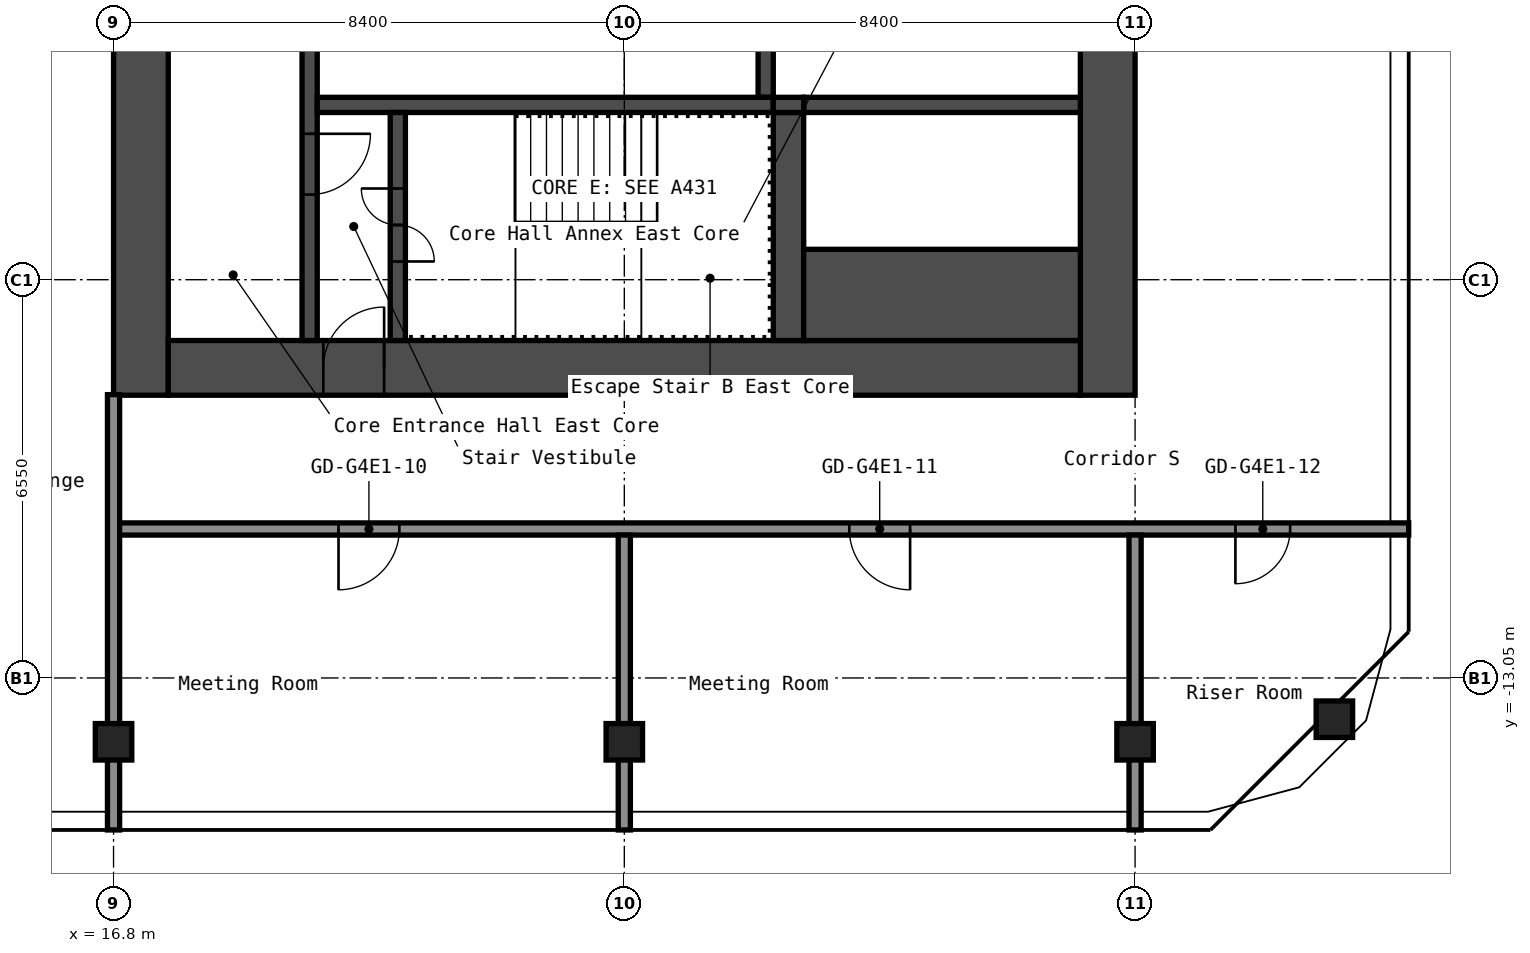
"""IFC4 building model, lengths in metres.
Left out: names, types, materials, properties, quantities, classifications, styles, units other than length and angle.
Written with IfcOpenShell. Run it as: python <this file> out.ifc"""

import sys

from ifc_helpers import new_model, si_unit, direction, frame, frame_2d, origin, origin_2d, place, context, subcontext, project, spatial, rectangle, hollow_rectangle, extrude, element, fill, save


model = new_model("IFC4")
c1 = context("Model", 3, precision=1e-05, world=origin(), true_north=direction((0.0, 1.0)))
c2 = subcontext(c1, "Body", "Model", "MODEL_VIEW")
j1 = project(units=[si_unit("LENGTHUNIT", "METRE"), si_unit("PLANEANGLEUNIT", "RADIAN")], contexts=[c1])
p1 = place(None, origin())
s1 = spatial("IfcSite", under=j1, at=p1, CompositionType="ELEMENT")
p2 = place(p1, origin())
s2 = spatial("IfcBuilding", under=s1, at=p2, CompositionType="ELEMENT")
p3 = place(p2, frame((0.0, 0.0, 215.4)))
s3 = spatial("IfcBuildingStorey", under=s2, at=p3, CompositionType="ELEMENT", Elevation=215.4)
for number, where, z_axis, x_axis in (
    (1, (16.8, -14.1, 0.0), (0.0, 0.0, 1.0), (1.0, 0.0, 0.0)),
    (2, (25.2, -14.1, 0.0), (0.0, 0.0, 1.0), (1.0, 0.0, 0.0)),
    (3, (33.6, -14.1, 0.0), (0.0, 0.0, 1.0), (1.0, 0.0, 0.0)),
    (4, (36.878, -13.729, 0.0), (0.0, 0.0, 1.0), (1.0, 0.0, 0.0)),
):
    element("IfcColumn", number, at=place(p3, frame(where, z_axis=z_axis, x_axis=x_axis)), inside=s3, PredefinedType="COLUMN", context=c2, shape_type="SweptSolid", body=[
        extrude(hollow_rectangle(XDim=0.6, YDim=0.6, WallThickness=0.025, InnerFilletRadius=0.038, OuterFilletRadius=0.062, at=origin_2d()), origin(), (0.0, 0.0, 1.0), 2.75),
    ])
p4 = place(p3, frame((17.25, -8.4, 0.0), z_axis=(0.0, 0.0, 1.0), x_axis=(0.0, 1.0, 0.0)))
e5 = element("IfcWall", 5, at=p4, inside=s3, PredefinedType="SHEAR", context=c2, shape_type="SweptSolid", body=[
    extrude(rectangle(XDim=16.8, YDim=0.9, at=frame_2d((8.4, 0.0))), origin(), (0.0, 0.0, 1.0), 2.75),
])
p5 = place(p4, frame((10.1, 0.0, 0.0)))
e6 = element("IfcOpeningElement", 6, at=p5, cuts=e5, PredefinedType="OPENING", context=c2, shape_type="SweptSolid", body=[
    extrude(rectangle(XDim=1.6, YDim=2.1, at=frame_2d((0.8, 1.05))), frame((0.0, 0.46, 0.0), z_axis=(0.0, -1.0, 0.0), x_axis=(1.0, 0.0, 0.0)), (0.0, 0.0, 1.0), 0.92),
])
p6 = place(p3, frame((33.15, -8.4, 0.0), z_axis=(0.0, 0.0, 1.0), x_axis=(0.0, 1.0, 0.0)))
e7 = element("IfcWall", 7, at=p6, inside=s3, PredefinedType="SHEAR", context=c2, shape_type="SweptSolid", body=[
    extrude(rectangle(XDim=16.8, YDim=0.9, at=frame_2d((8.4, 0.0))), origin(), (0.0, 0.0, 1.0), 2.75),
])
p7 = place(p3, frame((17.7, -7.95, 0.0), z_axis=(0.0, 0.0, 1.0), x_axis=(1.0, 0.0, 0.0)))
e8 = element("IfcWall", 8, at=p7, inside=s3, PredefinedType="SHEAR", context=c2, shape_type="SweptSolid", body=[
    extrude(rectangle(XDim=15.0, YDim=0.9, at=frame_2d((7.5, 0.0))), origin(), (0.0, 0.0, 1.0), 2.75),
])
p8 = place(p7, frame((2.55, 0.0, 0.0)))
e9 = element("IfcOpeningElement", 9, at=p8, cuts=e8, PredefinedType="OPENING", context=c2, shape_type="SweptSolid", body=[
    extrude(rectangle(XDim=1.0, YDim=2.1, at=frame_2d((0.5, 1.05))), frame((0.0, 0.46, 0.0), z_axis=(0.0, -1.0, 0.0), x_axis=(1.0, 0.0, 0.0)), (0.0, 0.0, 1.0), 0.92),
])
p9 = place(p3, frame((20.025, -7.5, 0.0), z_axis=(0.0, 0.0, 1.0), x_axis=(0.0, 1.0, 0.0)))
e10 = element("IfcWall", 10, at=p9, inside=s3, PredefinedType="SHEAR", context=c2, shape_type="SweptSolid", body=[
    extrude(rectangle(XDim=6.3, YDim=0.25, at=frame_2d((3.15, 0.0))), origin(), (0.0, 0.0, 1.0), 2.75),
])
p10 = place(p9, frame((2.4, 0.0, 0.0)))
e11 = element("IfcOpeningElement", 11, at=p10, cuts=e10, PredefinedType="OPENING", context=c2, shape_type="SweptSolid", body=[
    extrude(rectangle(XDim=1.0, YDim=2.1, at=frame_2d((0.5, 1.05))), frame((0.0, 0.135, 0.0), z_axis=(0.0, -1.0, 0.0), x_axis=(1.0, 0.0, 0.0)), (0.0, 0.0, 1.0), 0.27),
])
p11 = place(p3, frame((27.525, -3.5, 0.0), z_axis=(0.0, 0.0, 1.0), x_axis=(0.0, 1.0, 0.0)))
e12 = element("IfcWall", 12, at=p11, inside=s3, PredefinedType="SHEAR", context=c2, shape_type="SweptSolid", body=[
    extrude(rectangle(XDim=2.05, YDim=0.25, at=frame_2d((1.025, 0.0))), origin(), (0.0, 0.0, 1.0), 2.75),
])
p12 = place(p3, frame((20.15, -3.625, 0.0), z_axis=(0.0, 0.0, 1.0), x_axis=(1.0, 0.0, 0.0)))
e13 = element("IfcWall", 13, at=p12, inside=s3, PredefinedType="SHEAR", context=c2, shape_type="SweptSolid", body=[
    extrude(rectangle(XDim=7.5, YDim=0.25, at=frame_2d((3.75, 0.0))), origin(), (0.0, 0.0, 1.0), 2.75),
])
p13 = place(p3, frame((21.475, -7.5, 0.0), z_axis=(0.0, 0.0, 1.0), x_axis=(0.0, 1.0, 0.0)))
e14 = element("IfcWall", 14, at=p13, inside=s3, PredefinedType="SHEAR", context=c2, shape_type="SweptSolid", body=[
    extrude(rectangle(XDim=3.75, YDim=0.25, at=frame_2d((1.875, 0.0))), origin(), (0.0, 0.0, 1.0), 2.75),
])
p14 = place(p13, frame((1.3, 0.0, 0.0)))
e15 = element("IfcOpeningElement", 15, at=p14, cuts=e14, PredefinedType="OPENING", context=c2, shape_type="SweptSolid", body=[
    extrude(rectangle(XDim=1.2, YDim=2.1, at=frame_2d((0.6, 1.05))), frame((0.0, 0.135, 0.0), z_axis=(0.0, -1.0, 0.0), x_axis=(1.0, 0.0, 0.0)), (0.0, 0.0, 1.0), 0.27),
])
p15 = place(p3, frame((27.9, -7.5, 0.0), z_axis=(0.0, 0.0, 1.0), x_axis=(0.0, 1.0, 0.0)))
e16 = element("IfcWall", 16, at=p15, inside=s3, PredefinedType="SHEAR", context=c2, shape_type="SweptSolid", body=[
    extrude(rectangle(XDim=3.75, YDim=0.5, at=frame_2d((1.875, 0.0))), origin(), (0.0, 0.0, 1.0), 2.75),
])
p16 = place(p3, frame((28.15, -3.625, 0.0), z_axis=(0.0, 0.0, 1.0), x_axis=(1.0, 0.0, 0.0)))
e17 = element("IfcWall", 17, at=p16, inside=s3, PredefinedType="SHEAR", context=c2, shape_type="SweptSolid", body=[
    extrude(rectangle(XDim=4.55, YDim=0.25, at=frame_2d((2.275, 0.0))), origin(), (0.0, 0.0, 1.0), 2.75),
])
p17 = place(p3, frame((28.15, -6.75, 0.0), z_axis=(0.0, 0.0, 1.0), x_axis=(1.0, 0.0, 0.0)))
e18 = element("IfcWall", 18, at=p17, inside=s3, PredefinedType="SHEAR", context=c2, shape_type="SweptSolid", body=[
    extrude(rectangle(XDim=4.55, YDim=1.5, at=frame_2d((2.275, 0.0))), origin(), (0.0, 0.0, 1.0), 2.75),
])
p18 = place(p3, frame((27.65, -3.625, 0.0), z_axis=(0.0, 0.0, 1.0), x_axis=(1.0, 0.0, 0.0)))
e19 = element("IfcWall", 19, at=p18, inside=s3, PredefinedType="SHEAR", context=c2, shape_type="SweptSolid", body=[
    extrude(rectangle(XDim=0.5, YDim=0.25, at=frame_2d((0.25, 0.0))), origin(), (0.0, 0.0, 1.0), 2.75),
])
p19 = place(p3, frame((16.8, -10.6, 0.0), z_axis=(0.0, 0.0, 1.0), x_axis=(1.0, 0.0, 0.0)))
e20 = element("IfcWall", 20, at=p19, inside=s3, PredefinedType="PARTITIONING", context=c2, shape_type="SweptSolid", body=[
    extrude(rectangle(XDim=21.3, YDim=0.2, at=frame_2d((10.65, 0.0))), origin(), (0.0, 0.0, 1.0), 2.75),
])
p20 = place(p19, frame((3.7, 0.0, 0.0)))
e21 = element("IfcOpeningElement", 21, at=p20, cuts=e20, PredefinedType="OPENING", context=c2, shape_type="SweptSolid", body=[
    extrude(rectangle(XDim=1.0, YDim=2.1, at=frame_2d((0.5, 1.05))), frame((0.0, 0.11, 0.0), z_axis=(0.0, -1.0, 0.0), x_axis=(1.0, 0.0, 0.0)), (0.0, 0.0, 1.0), 0.22),
])
p21 = place(p19, frame((12.1, 0.0, 0.0)))
e22 = element("IfcOpeningElement", 22, at=p21, cuts=e20, PredefinedType="OPENING", context=c2, shape_type="SweptSolid", body=[
    extrude(rectangle(XDim=1.0, YDim=2.1, at=frame_2d((0.5, 1.05))), frame((0.0, 0.11, 0.0), z_axis=(0.0, -1.0, 0.0), x_axis=(1.0, 0.0, 0.0)), (0.0, 0.0, 1.0), 0.22),
])
p22 = place(p19, frame((18.45, 0.0, 0.0)))
e23 = element("IfcOpeningElement", 23, at=p22, cuts=e20, PredefinedType="OPENING", context=c2, shape_type="SweptSolid", body=[
    extrude(rectangle(XDim=0.9, YDim=2.1, at=frame_2d((0.45, 1.05))), frame((0.0, 0.11, 0.0), z_axis=(0.0, -1.0, 0.0), x_axis=(1.0, 0.0, 0.0)), (0.0, 0.0, 1.0), 0.22),
])
p23 = place(p3, frame((16.8, -15.55, 0.0), z_axis=(0.0, 0.0, 1.0), x_axis=(0.0, 1.0, 0.0)))
e24 = element("IfcWall", 24, at=p23, inside=s3, PredefinedType="PARTITIONING", context=c2, shape_type="SweptSolid", body=[
    extrude(rectangle(XDim=7.16, YDim=0.2, at=frame_2d((3.58, 0.0))), origin(), (0.0, 0.0, 1.0), 2.75),
])
for number, where, z_axis, x_axis in (
    (25, (25.2, -15.55, 0.0), (0.0, 0.0, 1.0), (0.0, 1.0, 0.0)),
    (26, (33.6, -15.55, 0.0), (0.0, 0.0, 1.0), (0.0, 1.0, 0.0)),
):
    element("IfcWall", number, at=place(p3, frame(where, z_axis=z_axis, x_axis=x_axis)), inside=s3, PredefinedType="PARTITIONING", context=c2, shape_type="SweptSolid", body=[
        extrude(rectangle(XDim=4.85, YDim=0.2, at=frame_2d((2.425, 0.0))), origin(), (0.0, 0.0, 1.0), 2.75),
    ])
p24 = place(p8, origin())
e27 = element("IfcDoor", 27, at=p24, inside=s3, OperationType="SINGLE_SWING_LEFT", PredefinedType="DOOR", context=c2, shape_type="SweptSolid", body=[
    extrude(rectangle(XDim=1.0, YDim=2.1, at=frame_2d((0.5, 1.05))), frame((0.0, 0.025, 0.0), z_axis=(0.0, -1.0, 0.0), x_axis=(1.0, 0.0, 0.0)), (0.0, 0.0, 1.0), 0.05),
])
fill(e9, e27)
p25 = place(p14, origin())
e28 = element("IfcDoor", 28, at=p25, inside=s3, OperationType="DOUBLE_DOOR_SINGLE_SWING", PredefinedType="DOOR", context=c2, shape_type="SweptSolid", body=[
    extrude(rectangle(XDim=1.2, YDim=2.1, at=frame_2d((0.6, 1.05))), frame((0.0, 0.025, 0.0), z_axis=(0.0, -1.0, 0.0), x_axis=(1.0, 0.0, 0.0)), (0.0, 0.0, 1.0), 0.05),
])
fill(e15, e28)
p26 = place(p10, origin())
e29 = element("IfcDoor", 29, at=p26, inside=s3, OperationType="SINGLE_SWING_RIGHT", PredefinedType="DOOR", context=c2, shape_type="SweptSolid", body=[
    extrude(rectangle(XDim=1.0, YDim=2.1, at=frame_2d((0.5, 1.05))), frame((0.0, 0.025, 0.0), z_axis=(0.0, -1.0, 0.0), x_axis=(1.0, 0.0, 0.0)), (0.0, 0.0, 1.0), 0.05),
])
fill(e11, e29)
p27 = place(p20, origin())
e30 = element("IfcDoor", 30, at=p27, inside=s3, OperationType="SINGLE_SWING_LEFT", PredefinedType="DOOR", context=c2, shape_type="SweptSolid", body=[
    extrude(rectangle(XDim=1.0, YDim=2.1, at=frame_2d((0.5, 1.05))), frame((0.0, 0.025, 0.0), z_axis=(0.0, -1.0, 0.0), x_axis=(1.0, 0.0, 0.0)), (0.0, 0.0, 1.0), 0.05),
])
fill(e21, e30)
p28 = place(p21, origin())
e31 = element("IfcDoor", 31, at=p28, inside=s3, OperationType="SINGLE_SWING_RIGHT", PredefinedType="DOOR", context=c2, shape_type="SweptSolid", body=[
    extrude(rectangle(XDim=1.0, YDim=2.1, at=frame_2d((0.5, 1.05))), frame((0.0, 0.025, 0.0), z_axis=(0.0, -1.0, 0.0), x_axis=(1.0, 0.0, 0.0)), (0.0, 0.0, 1.0), 0.05),
])
fill(e22, e31)
p29 = place(p22, origin())
e32 = element("IfcDoor", 32, at=p29, inside=s3, OperationType="SINGLE_SWING_LEFT", PredefinedType="DOOR", context=c2, shape_type="SweptSolid", body=[
    extrude(rectangle(XDim=0.9, YDim=2.1, at=frame_2d((0.45, 1.05))), frame((0.0, 0.025, 0.0), z_axis=(0.0, -1.0, 0.0), x_axis=(1.0, 0.0, 0.0)), (0.0, 0.0, 1.0), 0.05),
])
fill(e23, e32)
save(model, sys.argv[1])
